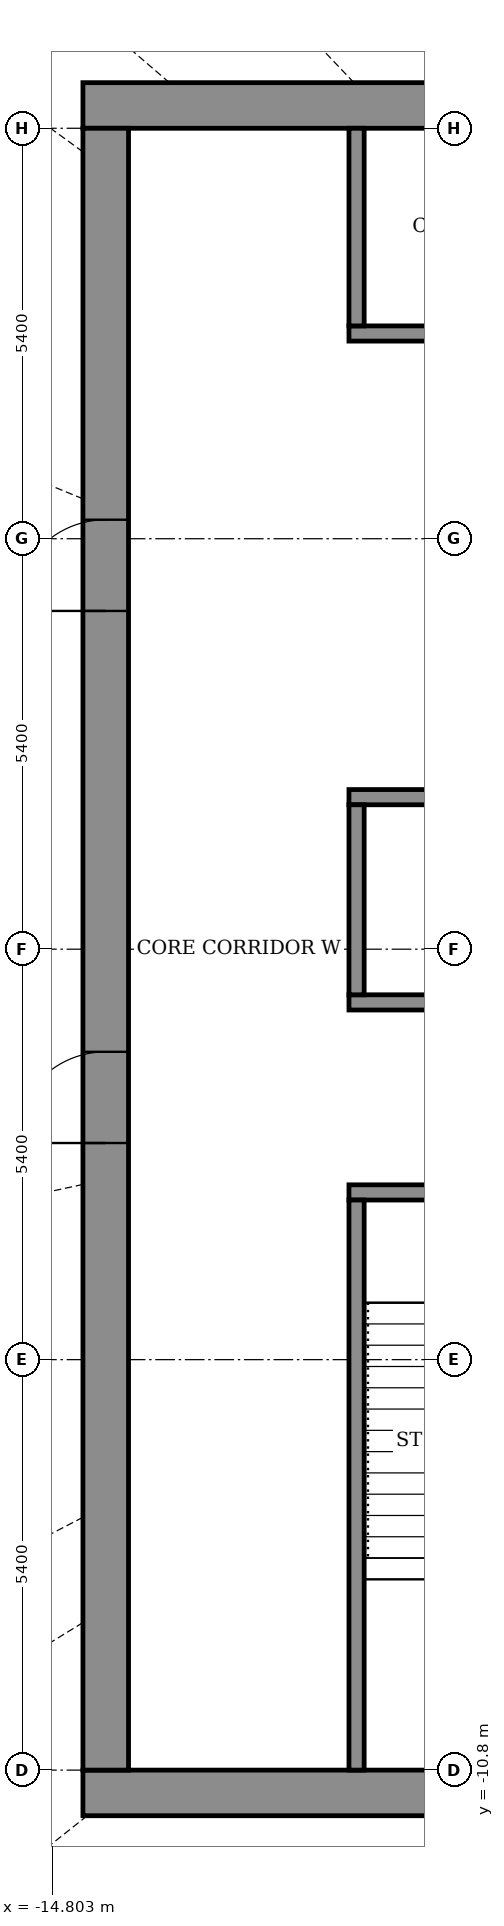
"""IFC4 building model, lengths in metres.
Left out: names, types, materials, properties, quantities, classifications, styles, units other than length and angle.
Written with IfcOpenShell. Run it as: python <this file> out.ifc"""

import sys

from ifc_helpers import new_model, si_unit, direction, frame, frame_2d, origin, place, context, subcontext, project, spatial, rectangle, extrude, element, fill, save


model = new_model("IFC4")
c1 = context("Model", 3, precision=1e-05, world=origin(), true_north=direction((0.0, 1.0)))
c2 = subcontext(c1, "Body", "Model", "MODEL_VIEW")
j1 = project(units=[si_unit("LENGTHUNIT", "METRE"), si_unit("PLANEANGLEUNIT", "RADIAN")], contexts=[c1])
p1 = place(None, origin())
s1 = spatial("IfcSite", under=j1, at=p1, CompositionType="ELEMENT")
p2 = place(p1, origin())
s2 = spatial("IfcBuilding", under=s1, at=p2, CompositionType="ELEMENT")
p3 = place(p2, frame((0.0, 0.0, 346.1)))
s3 = spatial("IfcBuildingStorey", under=s2, at=p3, CompositionType="ELEMENT", Elevation=346.1)
for number, where, z_axis, x_axis in (
    (1, (-14.4, -11.1, 0.0), (0.0, 0.0, 1.0), (1.0, 0.0, 0.0)),
    (2, (-14.4, 11.1, 0.0), (0.0, 0.0, 1.0), (1.0, 0.0, 0.0)),
):
    element("IfcWall", number, at=place(p3, frame(where, z_axis=z_axis, x_axis=x_axis)), inside=s3, PredefinedType="SHEAR", context=c2, shape_type="SweptSolid", body=[
        extrude(rectangle(XDim=28.8, YDim=0.6, at=frame_2d((14.4, 0.0))), origin(), (0.0, 0.0, 1.0), 4.6),
    ])
p4 = place(p3, frame((-14.1, -10.8, 0.0), z_axis=(0.0, 0.0, 1.0), x_axis=(0.0, 1.0, 0.0)))
e3 = element("IfcWall", 3, at=p4, inside=s3, PredefinedType="SHEAR", context=c2, shape_type="SweptSolid", body=[
    extrude(rectangle(XDim=21.6, YDim=0.6, at=frame_2d((10.8, 0.0))), origin(), (0.0, 0.0, 1.0), 4.6),
])
p5 = place(p4, frame((8.25, 0.0, 0.0)))
e4 = element("IfcOpeningElement", 4, at=p5, cuts=e3, PredefinedType="OPENING", context=c2, shape_type="SweptSolid", body=[
    extrude(rectangle(XDim=1.2, YDim=2.1, at=frame_2d((0.6, 1.05))), frame((0.0, 0.31, 0.0), z_axis=(0.0, -1.0, 0.0), x_axis=(1.0, 0.0, 0.0)), (0.0, 0.0, 1.0), 0.62),
])
p6 = place(p4, frame((15.25, 0.0, 0.0)))
e5 = element("IfcOpeningElement", 5, at=p6, cuts=e3, PredefinedType="OPENING", context=c2, shape_type="SweptSolid", body=[
    extrude(rectangle(XDim=1.2, YDim=2.1, at=frame_2d((0.6, 1.05))), frame((0.0, 0.31, 0.0), z_axis=(0.0, -1.0, 0.0), x_axis=(1.0, 0.0, 0.0)), (0.0, 0.0, 1.0), 0.62),
])
p7 = place(p3, frame((-10.9, -3.2, 0.0), z_axis=(0.0, 0.0, 1.0), x_axis=(1.0, 0.0, 0.0)))
e6 = element("IfcWall", 6, at=p7, inside=s3, PredefinedType="SHEAR", context=c2, shape_type="SweptSolid", body=[
    extrude(rectangle(XDim=21.8, YDim=0.2, at=frame_2d((10.9, 0.0))), origin(), (0.0, 0.0, 1.0), 4.05),
])
p8 = place(p7, frame((1.075, 0.0, 0.0)))
e7 = element("IfcOpeningElement", 7, at=p8, cuts=e6, PredefinedType="OPENING", context=c2, shape_type="SweptSolid", body=[
    extrude(rectangle(XDim=1.1, YDim=2.1, at=frame_2d((0.55, 1.05))), frame((0.0, 0.11, 0.0), z_axis=(0.0, -1.0, 0.0), x_axis=(1.0, 0.0, 0.0)), (0.0, 0.0, 1.0), 0.22),
])
p9 = place(p7, frame((10.325, 0.0, 0.0)))
e8 = element("IfcOpeningElement", 8, at=p9, cuts=e6, PredefinedType="OPENING", context=c2, shape_type="SweptSolid", body=[
    extrude(rectangle(XDim=1.1, YDim=2.1, at=frame_2d((0.55, 1.05))), frame((0.0, 0.11, 0.0), z_axis=(0.0, -1.0, 0.0), x_axis=(1.0, 0.0, 0.0)), (0.0, 0.0, 1.0), 0.22),
])
p10 = place(p7, frame((19.625, 0.0, 0.0)))
e9 = element("IfcOpeningElement", 9, at=p10, cuts=e6, PredefinedType="OPENING", context=c2, shape_type="SweptSolid", body=[
    extrude(rectangle(XDim=1.1, YDim=2.1, at=frame_2d((0.55, 1.05))), frame((0.0, 0.11, 0.0), z_axis=(0.0, -1.0, 0.0), x_axis=(1.0, 0.0, 0.0)), (0.0, 0.0, 1.0), 0.22),
])
p11 = place(p7, frame((5.7, 0.0, 0.0)))
e10 = element("IfcOpeningElement", 10, at=p11, cuts=e6, PredefinedType="OPENING", context=c2, shape_type="SweptSolid", body=[
    extrude(rectangle(XDim=1.1, YDim=2.1, at=frame_2d((0.55, 1.05))), frame((0.0, 0.11, 0.0), z_axis=(0.0, -1.0, 0.0), x_axis=(1.0, 0.0, 0.0)), (0.0, 0.0, 1.0), 0.22),
])
p12 = place(p7, frame((14.975, 0.0, 0.0)))
e11 = element("IfcOpeningElement", 11, at=p12, cuts=e6, PredefinedType="OPENING", context=c2, shape_type="SweptSolid", body=[
    extrude(rectangle(XDim=1.1, YDim=2.1, at=frame_2d((0.55, 1.05))), frame((0.0, 0.11, 0.0), z_axis=(0.0, -1.0, 0.0), x_axis=(1.0, 0.0, 0.0)), (0.0, 0.0, 1.0), 0.22),
])
p13 = place(p3, frame((-10.9, -0.7, 0.0), z_axis=(0.0, 0.0, 1.0), x_axis=(1.0, 0.0, 0.0)))
e12 = element("IfcWall", 12, at=p13, inside=s3, PredefinedType="SHEAR", context=c2, shape_type="SweptSolid", body=[
    extrude(rectangle(XDim=21.8, YDim=0.2, at=frame_2d((10.9, 0.0))), origin(), (0.0, 0.0, 1.0), 4.05),
])
p14 = place(p3, frame((-10.9, 2.0, 0.0), z_axis=(0.0, 0.0, 1.0), x_axis=(1.0, 0.0, 0.0)))
e13 = element("IfcWall", 13, at=p14, inside=s3, PredefinedType="SHEAR", context=c2, shape_type="SweptSolid", body=[
    extrude(rectangle(XDim=21.8, YDim=0.2, at=frame_2d((10.9, 0.0))), origin(), (0.0, 0.0, 1.0), 4.05),
])
p15 = place(p14, frame((4.95, 0.0, 0.0)))
e14 = element("IfcOpeningElement", 14, at=p15, cuts=e13, PredefinedType="OPENING", context=c2, shape_type="SweptSolid", body=[
    extrude(rectangle(XDim=1.1, YDim=2.1, at=frame_2d((0.55, 1.05))), frame((0.0, 0.11, 0.0), z_axis=(0.0, -1.0, 0.0), x_axis=(1.0, 0.0, 0.0)), (0.0, 0.0, 1.0), 0.22),
])
p16 = place(p14, frame((7.65, 0.0, 0.0)))
e15 = element("IfcOpeningElement", 15, at=p16, cuts=e13, PredefinedType="OPENING", context=c2, shape_type="SweptSolid", body=[
    extrude(rectangle(XDim=1.1, YDim=2.1, at=frame_2d((0.55, 1.05))), frame((0.0, 0.11, 0.0), z_axis=(0.0, -1.0, 0.0), x_axis=(1.0, 0.0, 0.0)), (0.0, 0.0, 1.0), 0.22),
])
p17 = place(p14, frame((10.35, 0.0, 0.0)))
e16 = element("IfcOpeningElement", 16, at=p17, cuts=e13, PredefinedType="OPENING", context=c2, shape_type="SweptSolid", body=[
    extrude(rectangle(XDim=1.1, YDim=2.1, at=frame_2d((0.55, 1.05))), frame((0.0, 0.11, 0.0), z_axis=(0.0, -1.0, 0.0), x_axis=(1.0, 0.0, 0.0)), (0.0, 0.0, 1.0), 0.22),
])
p18 = place(p14, frame((1.675, 0.0, 0.0)))
e17 = element("IfcOpeningElement", 17, at=p18, cuts=e13, PredefinedType="OPENING", context=c2, shape_type="SweptSolid", body=[
    extrude(rectangle(XDim=0.9, YDim=2.1, at=frame_2d((0.45, 1.05))), frame((0.0, 0.11, 0.0), z_axis=(0.0, -1.0, 0.0), x_axis=(1.0, 0.0, 0.0)), (0.0, 0.0, 1.0), 0.22),
])
p19 = place(p14, frame((13.825, 0.0, 0.0)))
e18 = element("IfcOpeningElement", 18, at=p19, cuts=e13, PredefinedType="OPENING", context=c2, shape_type="SweptSolid", body=[
    extrude(rectangle(XDim=0.9, YDim=2.1, at=frame_2d((0.45, 1.05))), frame((0.0, 0.11, 0.0), z_axis=(0.0, -1.0, 0.0), x_axis=(1.0, 0.0, 0.0)), (0.0, 0.0, 1.0), 0.22),
])
p20 = place(p14, frame((18.55, 0.0, 0.0)))
e19 = element("IfcOpeningElement", 19, at=p20, cuts=e13, PredefinedType="OPENING", context=c2, shape_type="SweptSolid", body=[
    extrude(rectangle(XDim=0.9, YDim=2.1, at=frame_2d((0.45, 1.05))), frame((0.0, 0.11, 0.0), z_axis=(0.0, -1.0, 0.0), x_axis=(1.0, 0.0, 0.0)), (0.0, 0.0, 1.0), 0.22),
])
p21 = place(p3, frame((-10.9, 8.1, 0.0), z_axis=(0.0, 0.0, 1.0), x_axis=(1.0, 0.0, 0.0)))
e20 = element("IfcWall", 20, at=p21, inside=s3, PredefinedType="SHEAR", context=c2, shape_type="SweptSolid", body=[
    extrude(rectangle(XDim=21.8, YDim=0.2, at=frame_2d((10.9, 0.0))), origin(), (0.0, 0.0, 1.0), 4.05),
])
p22 = place(p21, frame((4.95, 0.0, 0.0)))
e21 = element("IfcOpeningElement", 21, at=p22, cuts=e20, PredefinedType="OPENING", context=c2, shape_type="SweptSolid", body=[
    extrude(rectangle(XDim=1.1, YDim=2.1, at=frame_2d((0.55, 1.05))), frame((0.0, 0.11, 0.0), z_axis=(0.0, -1.0, 0.0), x_axis=(1.0, 0.0, 0.0)), (0.0, 0.0, 1.0), 0.22),
])
p23 = place(p21, frame((7.65, 0.0, 0.0)))
e22 = element("IfcOpeningElement", 22, at=p23, cuts=e20, PredefinedType="OPENING", context=c2, shape_type="SweptSolid", body=[
    extrude(rectangle(XDim=1.1, YDim=2.1, at=frame_2d((0.55, 1.05))), frame((0.0, 0.11, 0.0), z_axis=(0.0, -1.0, 0.0), x_axis=(1.0, 0.0, 0.0)), (0.0, 0.0, 1.0), 0.22),
])
p24 = place(p21, frame((10.35, 0.0, 0.0)))
e23 = element("IfcOpeningElement", 23, at=p24, cuts=e20, PredefinedType="OPENING", context=c2, shape_type="SweptSolid", body=[
    extrude(rectangle(XDim=1.1, YDim=2.1, at=frame_2d((0.55, 1.05))), frame((0.0, 0.11, 0.0), z_axis=(0.0, -1.0, 0.0), x_axis=(1.0, 0.0, 0.0)), (0.0, 0.0, 1.0), 0.22),
])
p25 = place(p21, frame((1.675, 0.0, 0.0)))
e24 = element("IfcOpeningElement", 24, at=p25, cuts=e20, PredefinedType="OPENING", context=c2, shape_type="SweptSolid", body=[
    extrude(rectangle(XDim=0.9, YDim=2.1, at=frame_2d((0.45, 1.05))), frame((0.0, 0.11, 0.0), z_axis=(0.0, -1.0, 0.0), x_axis=(1.0, 0.0, 0.0)), (0.0, 0.0, 1.0), 0.22),
])
p26 = place(p21, frame((13.825, 0.0, 0.0)))
e25 = element("IfcOpeningElement", 25, at=p26, cuts=e20, PredefinedType="OPENING", context=c2, shape_type="SweptSolid", body=[
    extrude(rectangle(XDim=0.9, YDim=2.1, at=frame_2d((0.45, 1.05))), frame((0.0, 0.11, 0.0), z_axis=(0.0, -1.0, 0.0), x_axis=(1.0, 0.0, 0.0)), (0.0, 0.0, 1.0), 0.22),
])
p27 = place(p21, frame((18.55, 0.0, 0.0)))
e26 = element("IfcOpeningElement", 26, at=p27, cuts=e20, PredefinedType="OPENING", context=c2, shape_type="SweptSolid", body=[
    extrude(rectangle(XDim=0.9, YDim=2.1, at=frame_2d((0.45, 1.05))), frame((0.0, 0.11, 0.0), z_axis=(0.0, -1.0, 0.0), x_axis=(1.0, 0.0, 0.0)), (0.0, 0.0, 1.0), 0.22),
])
p28 = place(p3, frame((-10.8, -10.8, 0.0), z_axis=(0.0, 0.0, 1.0), x_axis=(0.0, 1.0, 0.0)))
e27 = element("IfcWall", 27, at=p28, inside=s3, PredefinedType="SHEAR", context=c2, shape_type="SweptSolid", body=[
    extrude(rectangle(XDim=7.5, YDim=0.2, at=frame_2d((3.75, 0.0))), origin(), (0.0, 0.0, 1.0), 4.05),
])
p29 = place(p3, frame((-10.8, -0.6, 0.0), z_axis=(0.0, 0.0, 1.0), x_axis=(0.0, 1.0, 0.0)))
e28 = element("IfcWall", 28, at=p29, inside=s3, PredefinedType="STANDARD", context=c2, shape_type="SweptSolid", body=[
    extrude(rectangle(XDim=2.5, YDim=0.2, at=frame_2d((1.25, 0.0))), origin(), (0.0, 0.0, 1.0), 4.05),
])
p30 = place(p3, frame((-10.8, 8.2, 0.0), z_axis=(0.0, 0.0, 1.0), x_axis=(0.0, 1.0, 0.0)))
e29 = element("IfcWall", 29, at=p30, inside=s3, PredefinedType="STANDARD", context=c2, shape_type="SweptSolid", body=[
    extrude(rectangle(XDim=2.6, YDim=0.2, at=frame_2d((1.3, 0.0))), origin(), (0.0, 0.0, 1.0), 4.05),
])
p31 = place(p5, origin())
e30 = element("IfcDoor", 30, at=p31, inside=s3, OperationType="DOUBLE_DOOR_SINGLE_SWING", PredefinedType="DOOR", context=c2, shape_type="SweptSolid", body=[
    extrude(rectangle(XDim=1.2, YDim=2.1, at=frame_2d((0.6, 1.05))), frame((0.0, 0.025, 0.0), z_axis=(0.0, -1.0, 0.0), x_axis=(1.0, 0.0, 0.0)), (0.0, 0.0, 1.0), 0.05),
])
fill(e4, e30)
p32 = place(p6, origin())
e31 = element("IfcDoor", 31, at=p32, inside=s3, OperationType="DOUBLE_DOOR_SINGLE_SWING", PredefinedType="DOOR", context=c2, shape_type="SweptSolid", body=[
    extrude(rectangle(XDim=1.2, YDim=2.1, at=frame_2d((0.6, 1.05))), frame((0.0, 0.025, 0.0), z_axis=(0.0, -1.0, 0.0), x_axis=(1.0, 0.0, 0.0)), (0.0, 0.0, 1.0), 0.05),
])
fill(e5, e31)
save(model, sys.argv[1])
